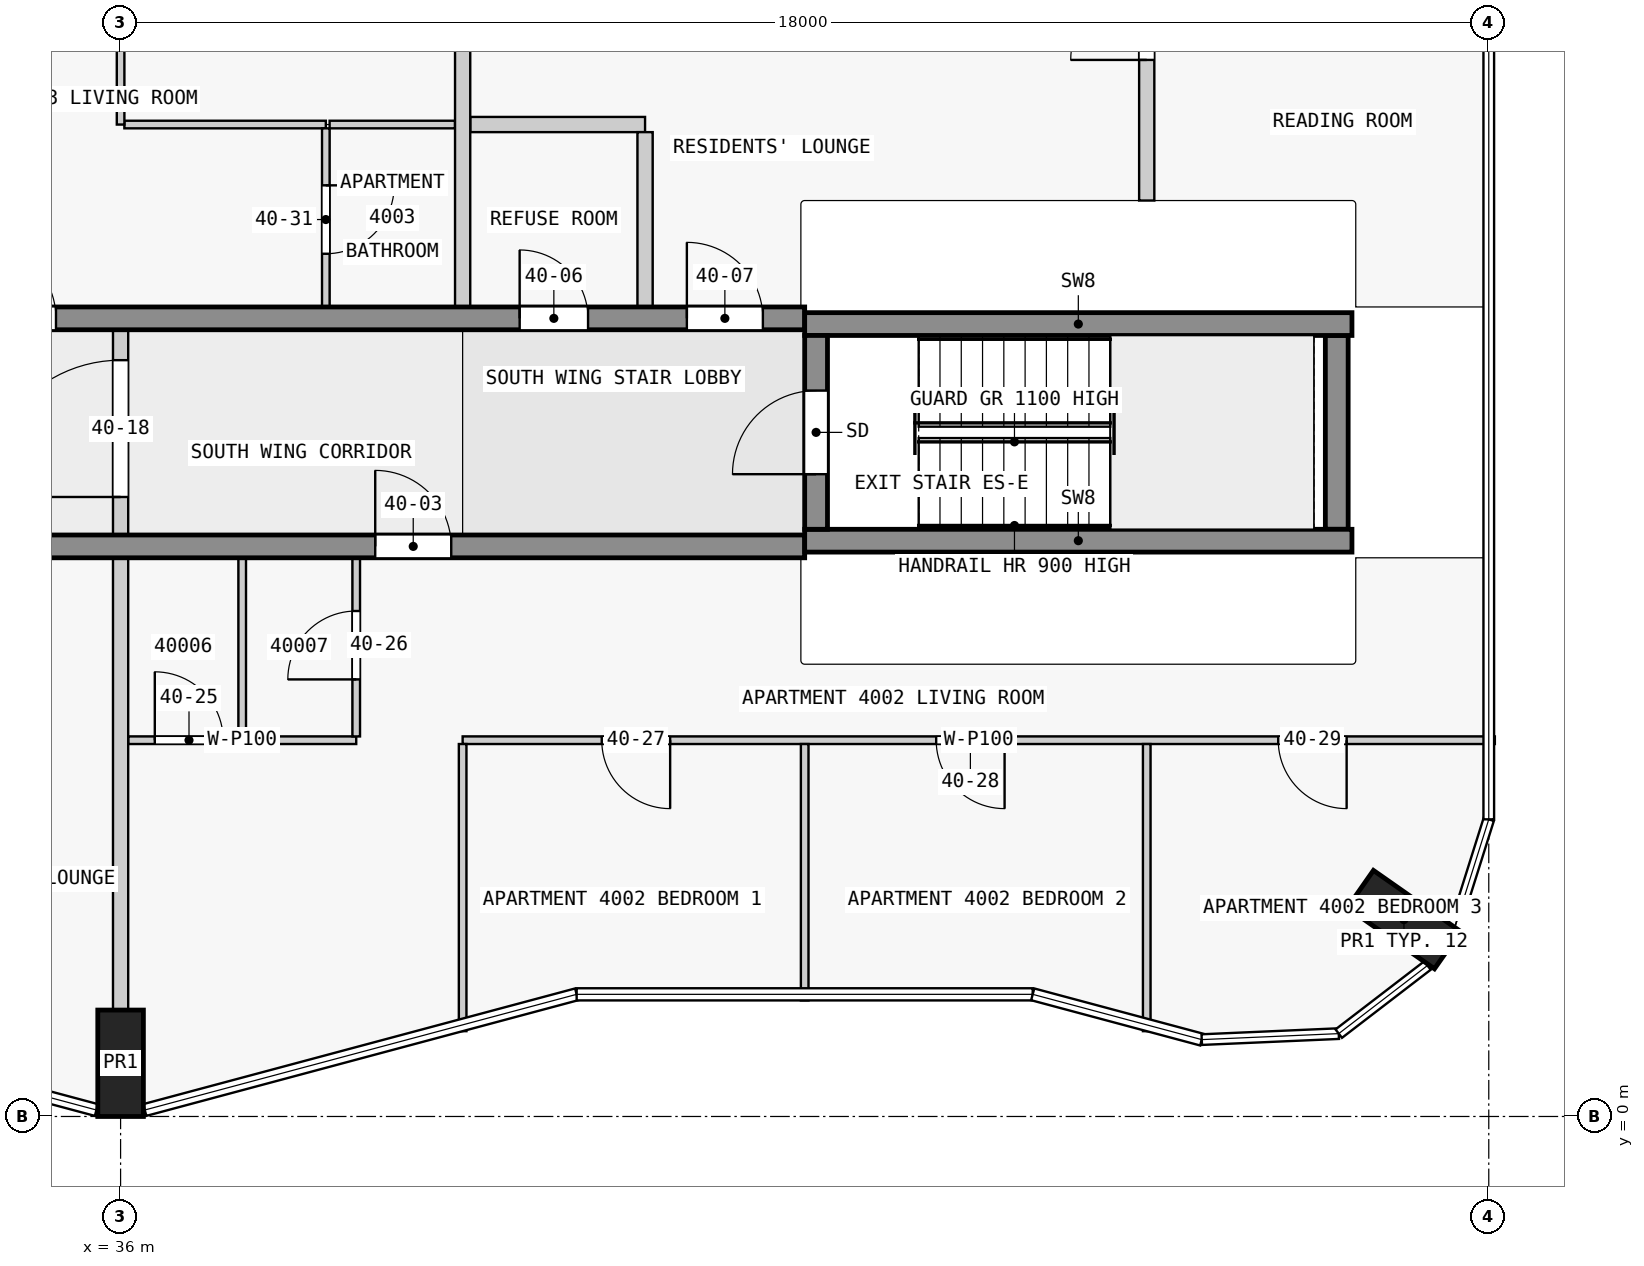
"""IFC4 building model, lengths in metres.
Left out: names, types, materials, properties, quantities, classifications, styles, units other than length and angle.
Written with IfcOpenShell. Run it as: python <this file> out.ifc"""

import sys

from ifc_helpers import new_model, si_unit, direction, frame, frame_2d, origin, origin_2d, place, context, subcontext, project, spatial, rectangle, extrude, element, fill, save


model = new_model("IFC4")
c1 = context("Model", 3, precision=1e-05, world=origin(), true_north=direction((0.0, 1.0)))
c2 = subcontext(c1, "Body", "Model", "MODEL_VIEW")
j1 = project(units=[si_unit("LENGTHUNIT", "METRE"), si_unit("PLANEANGLEUNIT", "RADIAN")], contexts=[c1])
p1 = place(None, origin())
s1 = spatial("IfcSite", under=j1, at=p1, CompositionType="ELEMENT")
p2 = place(p1, origin())
s2 = spatial("IfcBuilding", under=s1, at=p2, CompositionType="ELEMENT")
p3 = place(p2, frame((0.0, 0.0, 156.9)))
s3 = spatial("IfcBuildingStorey", under=s2, at=p3, CompositionType="ELEMENT", Elevation=156.9)
for number, where, z_axis, x_axis in (
    (1, (36.0, 0.7, 0.0), (0.0, 0.0, 1.0), (1.0, 0.0, 0.0)),
    (2, (52.884, 2.59, 0.0), (0.0, 0.0, 1.0), (0.574, 0.819, 0.0)),
):
    element("IfcColumn", number, at=place(p3, frame(where, z_axis=z_axis, x_axis=x_axis)), inside=s3, PredefinedType="COLUMN", context=c2, shape_type="SweptSolid", body=[
        extrude(rectangle(XDim=0.6, YDim=1.4, at=origin_2d()), origin(), (0.0, 0.0, 1.0), 3.5),
    ])
p4 = place(p3, frame((45.15, 7.725, 0.0), z_axis=(0.0, 0.0, 1.0), x_axis=(0.0, 1.0, 0.0)))
e3 = element("IfcWall", 3, at=p4, inside=s3, PredefinedType="SHEAR", context=c2, shape_type="SweptSolid", body=[
    extrude(rectangle(XDim=2.55, YDim=0.3, at=frame_2d((1.275, 0.0))), origin(), (0.0, 0.0, 1.0), 3.5),
])
p5 = place(p4, frame((0.725, 0.0, 0.0)))
e4 = element("IfcOpeningElement", 4, at=p5, cuts=e3, PredefinedType="OPENING", context=c2, shape_type="SweptSolid", body=[
    extrude(rectangle(XDim=1.1, YDim=2.1, at=frame_2d((0.55, 1.05))), frame((0.0, 0.16, 0.0), z_axis=(0.0, -1.0, 0.0), x_axis=(1.0, 0.0, 0.0)), (0.0, 0.0, 1.0), 0.32),
])
p6 = place(p3, frame((52.0, 7.725, 0.0), z_axis=(0.0, 0.0, 1.0), x_axis=(0.0, 1.0, 0.0)))
e5 = element("IfcWall", 5, at=p6, inside=s3, PredefinedType="SHEAR", context=c2, shape_type="SweptSolid", body=[
    extrude(rectangle(XDim=2.55, YDim=0.3, at=frame_2d((1.275, 0.0))), origin(), (0.0, 0.0, 1.0), 3.5),
])
for number, where, z_axis, x_axis in (
    (6, (45.0, 7.575, 0.0), (0.0, 0.0, 1.0), (1.0, 0.0, 0.0)),
    (7, (45.0, 10.425, 0.0), (0.0, 0.0, 1.0), (1.0, 0.0, 0.0)),
):
    element("IfcWall", number, at=place(p3, frame(where, z_axis=z_axis, x_axis=x_axis)), inside=s3, PredefinedType="SHEAR", context=c2, shape_type="SweptSolid", body=[
        extrude(rectangle(XDim=7.2, YDim=0.3, at=frame_2d((3.6, 0.0))), origin(), (0.0, 0.0, 1.0), 3.5),
    ])
p7 = place(p3, frame((22.5, 7.5, 0.0), z_axis=(0.0, 0.0, 1.0), x_axis=(1.0, 0.0, 0.0)))
e8 = element("IfcWall", 8, at=p7, inside=s3, PredefinedType="SHEAR", context=c2, shape_type="SweptSolid", body=[
    extrude(rectangle(XDim=22.5, YDim=0.3, at=frame_2d((11.25, 0.0))), origin(), (0.0, 0.0, 1.0), 3.25),
])
p8 = place(p7, frame((4.05, 0.0, 0.0)))
e9 = element("IfcOpeningElement", 9, at=p8, cuts=e8, PredefinedType="OPENING", context=c2, shape_type="SweptSolid", body=[
    extrude(rectangle(XDim=1.0, YDim=2.1, at=frame_2d((0.5, 1.05))), frame((0.0, 0.16, 0.0), z_axis=(0.0, -1.0, 0.0), x_axis=(1.0, 0.0, 0.0)), (0.0, 0.0, 1.0), 0.32),
])
p9 = place(p7, frame((10.35, 0.0, 0.0)))
e10 = element("IfcOpeningElement", 10, at=p9, cuts=e8, PredefinedType="OPENING", context=c2, shape_type="SweptSolid", body=[
    extrude(rectangle(XDim=1.8, YDim=2.1, at=frame_2d((0.9, 1.05))), frame((0.0, 0.16, 0.0), z_axis=(0.0, -1.0, 0.0), x_axis=(1.0, 0.0, 0.0)), (0.0, 0.0, 1.0), 0.32),
])
p10 = place(p7, frame((16.85, 0.0, 0.0)))
e11 = element("IfcOpeningElement", 11, at=p10, cuts=e8, PredefinedType="OPENING", context=c2, shape_type="SweptSolid", body=[
    extrude(rectangle(XDim=1.0, YDim=2.1, at=frame_2d((0.5, 1.05))), frame((0.0, 0.16, 0.0), z_axis=(0.0, -1.0, 0.0), x_axis=(1.0, 0.0, 0.0)), (0.0, 0.0, 1.0), 0.32),
])
p11 = place(p3, frame((22.5, 10.5, 0.0), z_axis=(0.0, 0.0, 1.0), x_axis=(1.0, 0.0, 0.0)))
e12 = element("IfcWall", 12, at=p11, inside=s3, PredefinedType="SHEAR", context=c2, shape_type="SweptSolid", body=[
    extrude(rectangle(XDim=22.5, YDim=0.3, at=frame_2d((11.25, 0.0))), origin(), (0.0, 0.0, 1.0), 3.25),
])
p12 = place(p11, frame((4.05, 0.0, 0.0)))
e13 = element("IfcOpeningElement", 13, at=p12, cuts=e12, PredefinedType="OPENING", context=c2, shape_type="SweptSolid", body=[
    extrude(rectangle(XDim=1.0, YDim=2.1, at=frame_2d((0.5, 1.05))), frame((0.0, 0.16, 0.0), z_axis=(0.0, -1.0, 0.0), x_axis=(1.0, 0.0, 0.0)), (0.0, 0.0, 1.0), 0.32),
])
p13 = place(p11, frame((11.65, 0.0, 0.0)))
e14 = element("IfcOpeningElement", 14, at=p13, cuts=e12, PredefinedType="OPENING", context=c2, shape_type="SweptSolid", body=[
    extrude(rectangle(XDim=1.0, YDim=2.1, at=frame_2d((0.5, 1.05))), frame((0.0, 0.16, 0.0), z_axis=(0.0, -1.0, 0.0), x_axis=(1.0, 0.0, 0.0)), (0.0, 0.0, 1.0), 0.32),
])
p14 = place(p11, frame((18.75, 0.0, 0.0)))
e15 = element("IfcOpeningElement", 15, at=p14, cuts=e12, PredefinedType="OPENING", context=c2, shape_type="SweptSolid", body=[
    extrude(rectangle(XDim=0.9, YDim=2.1, at=frame_2d((0.45, 1.05))), frame((0.0, 0.16, 0.0), z_axis=(0.0, -1.0, 0.0), x_axis=(1.0, 0.0, 0.0)), (0.0, 0.0, 1.0), 0.32),
])
p15 = place(p11, frame((20.95, 0.0, 0.0)))
e16 = element("IfcOpeningElement", 16, at=p15, cuts=e12, PredefinedType="OPENING", context=c2, shape_type="SweptSolid", body=[
    extrude(rectangle(XDim=1.0, YDim=2.1, at=frame_2d((0.5, 1.05))), frame((0.0, 0.16, 0.0), z_axis=(0.0, -1.0, 0.0), x_axis=(1.0, 0.0, 0.0)), (0.0, 0.0, 1.0), 0.32),
])
p16 = place(p3, frame((54.08, 4.95, 0.0), z_axis=(0.0, 0.0, 1.0), x_axis=(-1.0, 0.0, 0.0)))
e17 = element("IfcWall", 17, at=p16, inside=s3, PredefinedType="PARTITIONING", context=c2, shape_type="SweptSolid", body=[
    extrude(rectangle(XDim=13.58, YDim=0.1, at=frame_2d((6.79, 0.0))), origin(), (0.0, 0.0, 1.0), 3.25),
])
p17 = place(p16, frame((10.85, 0.0, 0.0)))
e18 = element("IfcOpeningElement", 18, at=p17, cuts=e17, PredefinedType="OPENING", context=c2, shape_type="SweptSolid", body=[
    extrude(rectangle(XDim=0.9, YDim=2.1, at=frame_2d((0.45, 1.05))), frame((0.0, 0.06, 0.0), z_axis=(0.0, -1.0, 0.0), x_axis=(1.0, 0.0, 0.0)), (0.0, 0.0, 1.0), 0.12),
])
p18 = place(p16, frame((6.45, 0.0, 0.0)))
e19 = element("IfcOpeningElement", 19, at=p18, cuts=e17, PredefinedType="OPENING", context=c2, shape_type="SweptSolid", body=[
    extrude(rectangle(XDim=0.9, YDim=2.1, at=frame_2d((0.45, 1.05))), frame((0.0, 0.06, 0.0), z_axis=(0.0, -1.0, 0.0), x_axis=(1.0, 0.0, 0.0)), (0.0, 0.0, 1.0), 0.12),
])
p19 = place(p16, frame((1.95, 0.0, 0.0)))
e20 = element("IfcOpeningElement", 20, at=p19, cuts=e17, PredefinedType="OPENING", context=c2, shape_type="SweptSolid", body=[
    extrude(rectangle(XDim=0.9, YDim=2.1, at=frame_2d((0.45, 1.05))), frame((0.0, 0.06, 0.0), z_axis=(0.0, -1.0, 0.0), x_axis=(1.0, 0.0, 0.0)), (0.0, 0.0, 1.0), 0.12),
])
p20 = place(p3, frame((36.1, 4.95, 0.0), z_axis=(0.0, 0.0, 1.0), x_axis=(1.0, 0.0, 0.0)))
e21 = element("IfcWall", 21, at=p20, inside=s3, PredefinedType="PARTITIONING", context=c2, shape_type="SweptSolid", body=[
    extrude(rectangle(XDim=3.0, YDim=0.1, at=frame_2d((1.5, 0.0))), origin(), (0.0, 0.0, 1.0), 3.25),
])
p21 = place(p20, frame((0.35, 0.0, 0.0)))
e22 = element("IfcOpeningElement", 22, at=p21, cuts=e21, PredefinedType="OPENING", context=c2, shape_type="SweptSolid", body=[
    extrude(rectangle(XDim=0.9, YDim=2.1, at=frame_2d((0.45, 1.05))), frame((0.0, 0.06, 0.0), z_axis=(0.0, -1.0, 0.0), x_axis=(1.0, 0.0, 0.0)), (0.0, 0.0, 1.0), 0.12),
])
p22 = place(p3, frame((40.4, 13.05, 0.0), z_axis=(0.0, 0.0, 1.0), x_axis=(-1.0, 0.0, 0.0)))
e23 = element("IfcWall", 23, at=p22, inside=s3, PredefinedType="PARTITIONING", context=c2, shape_type="SweptSolid", body=[
    extrude(rectangle(XDim=1.65, YDim=0.1, at=frame_2d((0.825, 0.0))), origin(), (0.0, 0.0, 1.0), 3.25),
])
p23 = place(p3, frame((36.05, 13.05, 0.0), z_axis=(0.0, 0.0, 1.0), x_axis=(1.0, 0.0, 0.0)))
e24 = element("IfcWall", 24, at=p23, inside=s3, PredefinedType="PARTITIONING", context=c2, shape_type="SweptSolid", body=[
    extrude(rectangle(XDim=2.65, YDim=0.1, at=frame_2d((1.325, 0.0))), origin(), (0.0, 0.0, 1.0), 3.25),
])
p24 = place(p3, frame((42.9, 13.05, 0.0), z_axis=(0.0, 0.0, 1.0), x_axis=(-1.0, 0.0, 0.0)))
e25 = element("IfcWall", 25, at=p24, inside=s3, PredefinedType="PARTITIONING", context=c2, shape_type="SweptSolid", body=[
    extrude(rectangle(XDim=2.3, YDim=0.2, at=frame_2d((1.15, 0.0))), origin(), (0.0, 0.0, 1.0), 3.25),
])
p25 = place(p3, frame((36.0, 16.6, 0.0), z_axis=(0.0, 0.0, 1.0), x_axis=(0.0, -1.0, 0.0)))
e26 = element("IfcWall", 26, at=p25, inside=s3, PredefinedType="PARTITIONING", context=c2, shape_type="SweptSolid", body=[
    extrude(rectangle(XDim=3.55, YDim=0.1, at=frame_2d((1.775, 0.0))), origin(), (0.0, 0.0, 1.0), 3.25),
])
p26 = place(p25, frame((1.35, 0.0, 0.0)))
e27 = element("IfcOpeningElement", 27, at=p26, cuts=e26, PredefinedType="OPENING", context=c2, shape_type="SweptSolid", body=[
    extrude(rectangle(XDim=0.9, YDim=2.1, at=frame_2d((0.45, 1.05))), frame((0.0, 0.06, 0.0), z_axis=(0.0, -1.0, 0.0), x_axis=(1.0, 0.0, 0.0)), (0.0, 0.0, 1.0), 0.12),
])
p27 = place(p3, frame((36.0, 1.4, 0.0), z_axis=(0.0, 0.0, 1.0), x_axis=(0.0, 1.0, 0.0)))
e28 = element("IfcWall", 28, at=p27, inside=s3, PredefinedType="PARTITIONING", context=c2, shape_type="SweptSolid", body=[
    extrude(rectangle(XDim=5.95, YDim=0.2, at=frame_2d((2.975, 0.0))), origin(), (0.0, 0.0, 1.0), 3.25),
])
p28 = place(p3, frame((37.6, 5.0, 0.0), z_axis=(0.0, 0.0, 1.0), x_axis=(0.0, 1.0, 0.0)))
e29 = element("IfcWall", 29, at=p28, inside=s3, PredefinedType="PARTITIONING", context=c2, shape_type="SweptSolid", body=[
    extrude(rectangle(XDim=2.35, YDim=0.1, at=frame_2d((1.175, 0.0))), origin(), (0.0, 0.0, 1.0), 3.25),
])
p29 = place(p3, frame((38.7, 13.0, 0.0), z_axis=(0.0, 0.0, 1.0), x_axis=(0.0, -1.0, 0.0)))
e30 = element("IfcWall", 30, at=p29, inside=s3, PredefinedType="PARTITIONING", context=c2, shape_type="SweptSolid", body=[
    extrude(rectangle(XDim=2.35, YDim=0.1, at=frame_2d((1.175, 0.0))), origin(), (0.0, 0.0, 1.0), 3.25),
])
p30 = place(p29, frame((0.75, 0.0, 0.0)))
e31 = element("IfcOpeningElement", 31, at=p30, cuts=e30, PredefinedType="OPENING", context=c2, shape_type="SweptSolid", body=[
    extrude(rectangle(XDim=0.9, YDim=2.1, at=frame_2d((0.45, 1.05))), frame((0.0, 0.06, 0.0), z_axis=(0.0, -1.0, 0.0), x_axis=(1.0, 0.0, 0.0)), (0.0, 0.0, 1.0), 0.12),
])
p31 = place(p3, frame((39.1, 5.0, 0.0), z_axis=(0.0, 0.0, 1.0), x_axis=(0.0, 1.0, 0.0)))
e32 = element("IfcWall", 32, at=p31, inside=s3, PredefinedType="PARTITIONING", context=c2, shape_type="SweptSolid", body=[
    extrude(rectangle(XDim=2.35, YDim=0.1, at=frame_2d((1.175, 0.0))), origin(), (0.0, 0.0, 1.0), 3.25),
])
p32 = place(p31, frame((0.75, 0.0, 0.0)))
e33 = element("IfcOpeningElement", 33, at=p32, cuts=e32, PredefinedType="OPENING", context=c2, shape_type="SweptSolid", body=[
    extrude(rectangle(XDim=0.9, YDim=2.1, at=frame_2d((0.45, 1.05))), frame((0.0, 0.06, 0.0), z_axis=(0.0, -1.0, 0.0), x_axis=(1.0, 0.0, 0.0)), (0.0, 0.0, 1.0), 0.12),
])
p33 = place(p3, frame((40.5, 4.9, 0.0), z_axis=(0.0, 0.0, 1.0), x_axis=(0.0, -1.0, 0.0)))
e34 = element("IfcWall", 34, at=p33, inside=s3, PredefinedType="PARTITIONING", context=c2, shape_type="SweptSolid", body=[
    extrude(rectangle(XDim=3.778, YDim=0.1, at=frame_2d((1.889, 0.0))), origin(), (0.0, 0.0, 1.0), 3.25),
])
p34 = place(p3, frame((40.5, 10.65, 0.0), z_axis=(0.0, 0.0, 1.0), x_axis=(0.0, 1.0, 0.0)))
e35 = element("IfcWall", 35, at=p34, inside=s3, PredefinedType="PARTITIONING", context=c2, shape_type="SweptSolid", body=[
    extrude(rectangle(XDim=6.228, YDim=0.2, at=frame_2d((3.114, 0.0))), origin(), (0.0, 0.0, 1.0), 3.25),
])
p35 = place(p3, frame((42.9, 10.65, 0.0), z_axis=(0.0, 0.0, 1.0), x_axis=(0.0, 1.0, 0.0)))
e36 = element("IfcWall", 36, at=p35, inside=s3, PredefinedType="PARTITIONING", context=c2, shape_type="SweptSolid", body=[
    extrude(rectangle(XDim=2.3, YDim=0.2, at=frame_2d((1.15, 0.0))), origin(), (0.0, 0.0, 1.0), 3.25),
])
p36 = place(p3, frame((45.0, 1.527, 0.0), z_axis=(0.0, 0.0, 1.0), x_axis=(0.0, 1.0, 0.0)))
e37 = element("IfcWall", 37, at=p36, inside=s3, PredefinedType="PARTITIONING", context=c2, shape_type="SweptSolid", body=[
    extrude(rectangle(XDim=3.373, YDim=0.1, at=frame_2d((1.687, 0.0))), origin(), (0.0, 0.0, 1.0), 3.25),
])
p37 = place(p3, frame((49.5, 1.122, 0.0), z_axis=(0.0, 0.0, 1.0), x_axis=(0.0, 1.0, 0.0)))
e38 = element("IfcWall", 38, at=p37, inside=s3, PredefinedType="PARTITIONING", context=c2, shape_type="SweptSolid", body=[
    extrude(rectangle(XDim=3.778, YDim=0.1, at=frame_2d((1.889, 0.0))), origin(), (0.0, 0.0, 1.0), 3.25),
])
p38 = place(p3, frame((49.5, 12.05, 0.0), z_axis=(0.0, 0.0, 1.0), x_axis=(0.0, 1.0, 0.0)))
e39 = element("IfcWall", 39, at=p38, inside=s3, PredefinedType="PARTITIONING", context=c2, shape_type="SweptSolid", body=[
    extrude(rectangle(XDim=4.828, YDim=0.2, at=frame_2d((2.414, 0.0))), origin(), (0.0, 0.0, 1.0), 3.25),
])
p39 = place(p38, frame((1.85, 0.0, 0.0)))
e40 = element("IfcOpeningElement", 40, at=p39, cuts=e39, PredefinedType="OPENING", context=c2, shape_type="SweptSolid", body=[
    extrude(rectangle(XDim=1.0, YDim=2.1, at=frame_2d((0.5, 1.05))), frame((0.0, 0.11, 0.0), z_axis=(0.0, -1.0, 0.0), x_axis=(1.0, 0.0, 0.0)), (0.0, 0.0, 1.0), 0.22),
])
p40 = place(p3, frame((36.0, 7.45, 0.0), z_axis=(0.0, 0.0, 1.0), x_axis=(0.0, 1.0, 0.0)))
e41 = element("IfcWall", 41, at=p40, inside=s3, PredefinedType="PARTITIONING", context=c2, shape_type="SweptSolid", body=[
    extrude(rectangle(XDim=3.2, YDim=0.2, at=frame_2d((1.6, 0.0))), origin(), (0.0, 0.0, 1.0), 3.25),
])
p41 = place(p40, frame((0.7, 0.0, 0.0)))
e42 = element("IfcOpeningElement", 42, at=p41, cuts=e41, PredefinedType="OPENING", context=c2, shape_type="SweptSolid", body=[
    extrude(rectangle(XDim=1.8, YDim=2.1, at=frame_2d((0.9, 1.05))), frame((0.0, 0.11, 0.0), z_axis=(0.0, -1.0, 0.0), x_axis=(1.0, 0.0, 0.0)), (0.0, 0.0, 1.0), 0.22),
])
p42 = place(p5, origin())
e43 = element("IfcDoor", 43, at=p42, inside=s3, OperationType="SINGLE_SWING_LEFT", PredefinedType="DOOR", context=c2, shape_type="SweptSolid", body=[
    extrude(rectangle(XDim=1.1, YDim=2.1, at=frame_2d((0.55, 1.05))), frame((0.0, 0.025, 0.0), z_axis=(0.0, -1.0, 0.0), x_axis=(1.0, 0.0, 0.0)), (0.0, 0.0, 1.0), 0.05),
])
fill(e4, e43)
p43 = place(p10, origin())
e44 = element("IfcDoor", 44, at=p43, inside=s3, OperationType="SINGLE_SWING_RIGHT", PredefinedType="DOOR", context=c2, shape_type="SweptSolid", body=[
    extrude(rectangle(XDim=1.0, YDim=2.1, at=frame_2d((0.5, 1.05))), frame((0.0, 0.025, 0.0), z_axis=(0.0, -1.0, 0.0), x_axis=(1.0, 0.0, 0.0)), (0.0, 0.0, 1.0), 0.05),
])
fill(e11, e44)
p44 = place(p13, origin())
e45 = element("IfcDoor", 45, at=p44, inside=s3, OperationType="SINGLE_SWING_RIGHT", PredefinedType="DOOR", context=c2, shape_type="SweptSolid", body=[
    extrude(rectangle(XDim=1.0, YDim=2.1, at=frame_2d((0.5, 1.05))), frame((0.0, 0.025, 0.0), z_axis=(0.0, -1.0, 0.0), x_axis=(1.0, 0.0, 0.0)), (0.0, 0.0, 1.0), 0.05),
])
fill(e14, e45)
p45 = place(p14, origin())
e46 = element("IfcDoor", 46, at=p45, inside=s3, OperationType="SINGLE_SWING_RIGHT", PredefinedType="DOOR", context=c2, shape_type="SweptSolid", body=[
    extrude(rectangle(XDim=0.9, YDim=2.1, at=frame_2d((0.45, 1.05))), frame((0.0, 0.025, 0.0), z_axis=(0.0, -1.0, 0.0), x_axis=(1.0, 0.0, 0.0)), (0.0, 0.0, 1.0), 0.05),
])
fill(e15, e46)
p46 = place(p15, origin())
e47 = element("IfcDoor", 47, at=p46, inside=s3, OperationType="SINGLE_SWING_RIGHT", PredefinedType="DOOR", context=c2, shape_type="SweptSolid", body=[
    extrude(rectangle(XDim=1.0, YDim=2.1, at=frame_2d((0.5, 1.05))), frame((0.0, 0.025, 0.0), z_axis=(0.0, -1.0, 0.0), x_axis=(1.0, 0.0, 0.0)), (0.0, 0.0, 1.0), 0.05),
])
fill(e16, e47)
p47 = place(p41, origin())
e48 = element("IfcDoor", 48, at=p47, inside=s3, OperationType="SINGLE_SWING_LEFT", PredefinedType="DOOR", context=c2, shape_type="SweptSolid", body=[
    extrude(rectangle(XDim=1.8, YDim=2.1, at=frame_2d((0.9, 1.05))), frame((0.0, 0.025, 0.0), z_axis=(0.0, -1.0, 0.0), x_axis=(1.0, 0.0, 0.0)), (0.0, 0.0, 1.0), 0.05),
])
fill(e42, e48)
p48 = place(p39, origin())
e49 = element("IfcDoor", 49, at=p48, inside=s3, OperationType="SINGLE_SWING_LEFT", PredefinedType="DOOR", context=c2, shape_type="SweptSolid", body=[
    extrude(rectangle(XDim=1.0, YDim=2.1, at=frame_2d((0.5, 1.05))), frame((0.0, 0.025, 0.0), z_axis=(0.0, -1.0, 0.0), x_axis=(1.0, 0.0, 0.0)), (0.0, 0.0, 1.0), 0.05),
])
fill(e40, e49)
p49 = place(p21, origin())
e50 = element("IfcDoor", 50, at=p49, inside=s3, OperationType="SINGLE_SWING_LEFT", PredefinedType="DOOR", context=c2, shape_type="SweptSolid", body=[
    extrude(rectangle(XDim=0.9, YDim=2.1, at=frame_2d((0.45, 1.05))), frame((0.0, 0.025, 0.0), z_axis=(0.0, -1.0, 0.0), x_axis=(1.0, 0.0, 0.0)), (0.0, 0.0, 1.0), 0.05),
])
fill(e22, e50)
p50 = place(p32, origin())
e51 = element("IfcDoor", 51, at=p50, inside=s3, OperationType="SINGLE_SWING_RIGHT", PredefinedType="DOOR", context=c2, shape_type="SweptSolid", body=[
    extrude(rectangle(XDim=0.9, YDim=2.1, at=frame_2d((0.45, 1.05))), frame((0.0, 0.025, 0.0), z_axis=(0.0, -1.0, 0.0), x_axis=(1.0, 0.0, 0.0)), (0.0, 0.0, 1.0), 0.05),
])
fill(e33, e51)
p51 = place(p17, origin())
e52 = element("IfcDoor", 52, at=p51, inside=s3, OperationType="SINGLE_SWING_RIGHT", PredefinedType="DOOR", context=c2, shape_type="SweptSolid", body=[
    extrude(rectangle(XDim=0.9, YDim=2.1, at=frame_2d((0.45, 1.05))), frame((0.0, 0.025, 0.0), z_axis=(0.0, -1.0, 0.0), x_axis=(1.0, 0.0, 0.0)), (0.0, 0.0, 1.0), 0.05),
])
fill(e18, e52)
p52 = place(p18, origin())
e53 = element("IfcDoor", 53, at=p52, inside=s3, OperationType="SINGLE_SWING_RIGHT", PredefinedType="DOOR", context=c2, shape_type="SweptSolid", body=[
    extrude(rectangle(XDim=0.9, YDim=2.1, at=frame_2d((0.45, 1.05))), frame((0.0, 0.025, 0.0), z_axis=(0.0, -1.0, 0.0), x_axis=(1.0, 0.0, 0.0)), (0.0, 0.0, 1.0), 0.05),
])
fill(e19, e53)
p53 = place(p19, origin())
e54 = element("IfcDoor", 54, at=p53, inside=s3, OperationType="SINGLE_SWING_LEFT", PredefinedType="DOOR", context=c2, shape_type="SweptSolid", body=[
    extrude(rectangle(XDim=0.9, YDim=2.1, at=frame_2d((0.45, 1.05))), frame((0.0, 0.025, 0.0), z_axis=(0.0, -1.0, 0.0), x_axis=(1.0, 0.0, 0.0)), (0.0, 0.0, 1.0), 0.05),
])
fill(e20, e54)
p54 = place(p30, origin())
e55 = element("IfcDoor", 55, at=p54, inside=s3, OperationType="SINGLE_SWING_RIGHT", PredefinedType="DOOR", context=c2, shape_type="SweptSolid", body=[
    extrude(rectangle(XDim=0.9, YDim=2.1, at=frame_2d((0.45, 1.05))), frame((0.0, 0.025, 0.0), z_axis=(0.0, -1.0, 0.0), x_axis=(1.0, 0.0, 0.0)), (0.0, 0.0, 1.0), 0.05),
])
fill(e31, e55)
save(model, sys.argv[1])
